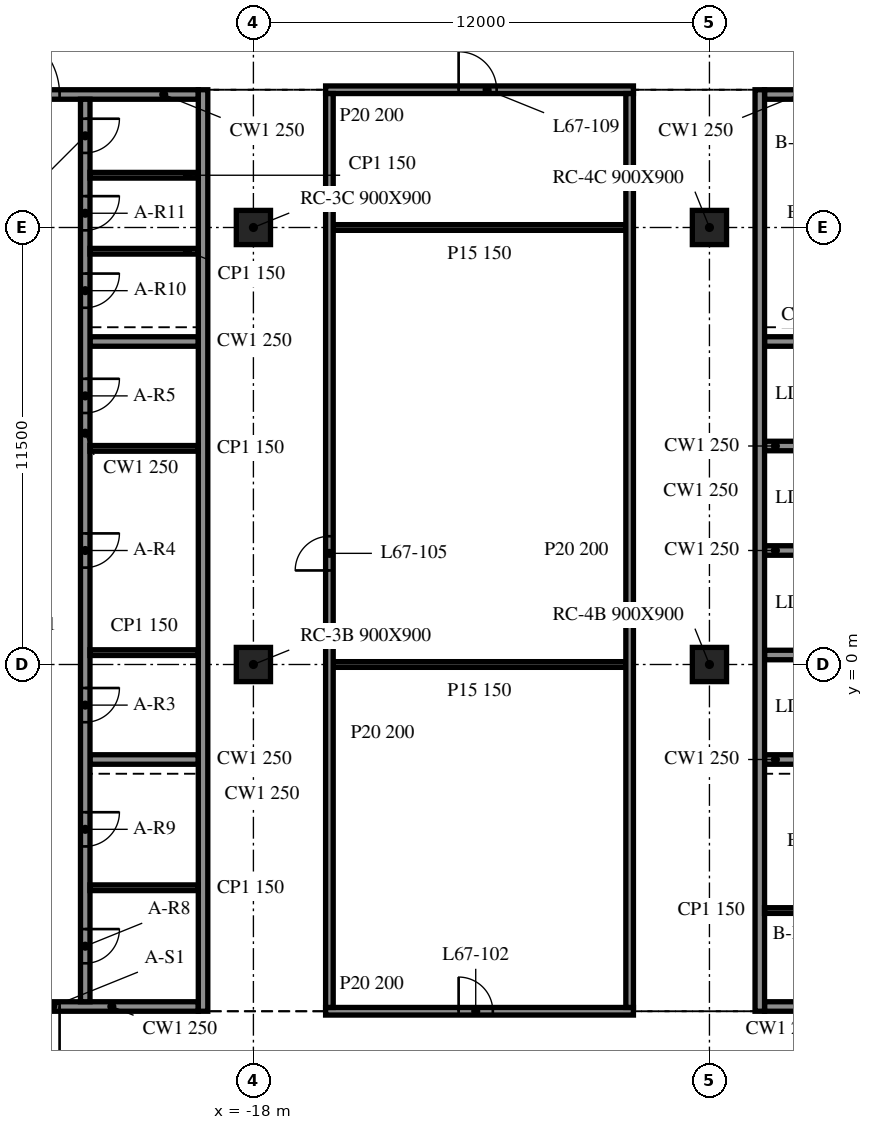
"""IFC4 building model, lengths in metres.
Left out: names, types, materials, properties, quantities, classifications, styles, units other than length and angle.
Written with IfcOpenShell. Run it as: python <this file> out.ifc"""

import sys

from ifc_helpers import new_model, si_unit, direction, frame, frame_2d, origin, origin_2d, place, context, subcontext, project, spatial, rectangle, extrude, element, fill, save


model = new_model("IFC4")
c1 = context("Model", 3, precision=1e-05, world=origin(), true_north=direction((0.0, 1.0)))
c2 = subcontext(c1, "Body", "Model", "MODEL_VIEW")
j1 = project(units=[si_unit("LENGTHUNIT", "METRE"), si_unit("PLANEANGLEUNIT", "RADIAN")], contexts=[c1])
p1 = place(None, origin())
s1 = spatial("IfcSite", under=j1, at=p1, CompositionType="ELEMENT")
p2 = place(p1, origin())
s2 = spatial("IfcBuilding", under=s1, at=p2, CompositionType="ELEMENT")
p3 = place(p2, frame((0.0, 0.0, 274.7)))
s3 = spatial("IfcBuildingStorey", under=s2, at=p3, CompositionType="ELEMENT", Elevation=274.7)
for number, where, z_axis, x_axis in (
    (1, (-18.0, 0.0, -0.34), (0.0, 0.0, 1.0), (1.0, 0.0, 0.0)),
    (2, (-18.0, 11.5, -0.34), (0.0, 0.0, 1.0), (1.0, 0.0, 0.0)),
    (3, (-6.0, 0.0, -0.34), (0.0, 0.0, 1.0), (1.0, 0.0, 0.0)),
    (4, (-6.0, 11.5, -0.34), (0.0, 0.0, 1.0), (1.0, 0.0, 0.0)),
):
    element("IfcColumn", number, at=place(p3, frame(where, z_axis=z_axis, x_axis=x_axis)), inside=s3, PredefinedType="COLUMN", context=c2, shape_type="SweptSolid", body=[
        extrude(rectangle(XDim=0.9, YDim=0.9, at=origin_2d()), origin(), (0.0, 0.0, 1.0), 3.8),
    ])
p4 = place(p3, frame((-19.325, -9.125, 0.0), z_axis=(0.0, 0.0, 1.0), x_axis=(0.0, 1.0, 0.0)))
e5 = element("IfcWall", 5, at=p4, inside=s3, PredefinedType="SOLIDWALL", context=c2, shape_type="SweptSolid", body=[
    extrude(rectangle(XDim=24.25, YDim=0.25, at=frame_2d((12.125, 0.0))), origin(), (0.0, 0.0, 1.0), 3.46),
])
p5 = place(p3, frame((-19.45, -9.0, 0.0), z_axis=(0.0, 0.0, 1.0), x_axis=(-1.0, 0.0, 0.0)))
e6 = element("IfcWall", 6, at=p5, inside=s3, PredefinedType="SOLIDWALL", context=c2, shape_type="SweptSolid", body=[
    extrude(rectangle(XDim=9.1, YDim=0.25, at=frame_2d((4.55, 0.0))), origin(), (0.0, 0.0, 1.0), 3.46),
])
p6 = place(p5, frame((3.65, 0.0, 0.0)))
e7 = element("IfcOpeningElement", 7, at=p6, cuts=e6, PredefinedType="OPENING", context=c2, shape_type="SweptSolid", body=[
    extrude(rectangle(XDim=1.8, YDim=2.1, at=frame_2d((0.9, 1.05))), frame((0.0, 0.135, 0.0), z_axis=(0.0, -1.0, 0.0), x_axis=(1.0, 0.0, 0.0)), (0.0, 0.0, 1.0), 0.27),
])
p7 = place(p3, frame((-28.55, 15.0, 0.0), z_axis=(0.0, 0.0, 1.0), x_axis=(1.0, 0.0, 0.0)))
e8 = element("IfcWall", 8, at=p7, inside=s3, PredefinedType="SOLIDWALL", context=c2, shape_type="SweptSolid", body=[
    extrude(rectangle(XDim=9.1, YDim=0.25, at=frame_2d((4.55, 0.0))), origin(), (0.0, 0.0, 1.0), 3.46),
])
p8 = place(p7, frame((3.65, 0.0, 0.0)))
e9 = element("IfcOpeningElement", 9, at=p8, cuts=e8, PredefinedType="OPENING", context=c2, shape_type="SweptSolid", body=[
    extrude(rectangle(XDim=1.8, YDim=2.1, at=frame_2d((0.9, 1.05))), frame((0.0, 0.135, 0.0), z_axis=(0.0, -1.0, 0.0), x_axis=(1.0, 0.0, 0.0)), (0.0, 0.0, 1.0), 0.27),
])
p9 = place(p3, frame((-22.425, 14.875, 0.0), z_axis=(0.0, 0.0, 1.0), x_axis=(0.0, -1.0, 0.0)))
e10 = element("IfcWall", 10, at=p9, inside=s3, PredefinedType="SOLIDWALL", context=c2, shape_type="SweptSolid", body=[
    extrude(rectangle(XDim=23.75, YDim=0.25, at=frame_2d((11.875, 0.0))), origin(), (0.0, 0.0, 1.0), 3.46),
])
p10 = place(p9, frame((15.494, 0.0, 0.0)))
e11 = element("IfcOpeningElement", 11, at=p10, cuts=e10, PredefinedType="OPENING", context=c2, shape_type="SweptSolid", body=[
    extrude(rectangle(XDim=0.9, YDim=2.1, at=frame_2d((0.45, 1.05))), frame((0.0, 0.135, 0.0), z_axis=(0.0, -1.0, 0.0), x_axis=(1.0, 0.0, 0.0)), (0.0, 0.0, 1.0), 0.27),
])
p11 = place(p9, frame((11.425, 0.0, 0.0)))
e12 = element("IfcOpeningElement", 12, at=p11, cuts=e10, PredefinedType="OPENING", context=c2, shape_type="SweptSolid", body=[
    extrude(rectangle(XDim=0.9, YDim=2.1, at=frame_2d((0.45, 1.05))), frame((0.0, 0.135, 0.0), z_axis=(0.0, -1.0, 0.0), x_axis=(1.0, 0.0, 0.0)), (0.0, 0.0, 1.0), 0.27),
])
p12 = place(p9, frame((7.356, 0.0, 0.0)))
e13 = element("IfcOpeningElement", 13, at=p12, cuts=e10, PredefinedType="OPENING", context=c2, shape_type="SweptSolid", body=[
    extrude(rectangle(XDim=0.9, YDim=2.1, at=frame_2d((0.45, 1.05))), frame((0.0, 0.135, 0.0), z_axis=(0.0, -1.0, 0.0), x_axis=(1.0, 0.0, 0.0)), (0.0, 0.0, 1.0), 0.27),
])
p13 = place(p9, frame((21.837, 0.0, 0.0)))
e14 = element("IfcOpeningElement", 14, at=p13, cuts=e10, PredefinedType="OPENING", context=c2, shape_type="SweptSolid", body=[
    extrude(rectangle(XDim=0.9, YDim=2.1, at=frame_2d((0.45, 1.05))), frame((0.0, 0.135, 0.0), z_axis=(0.0, -1.0, 0.0), x_axis=(1.0, 0.0, 0.0)), (0.0, 0.0, 1.0), 0.27),
])
p14 = place(p9, frame((18.762, 0.0, 0.0)))
e15 = element("IfcOpeningElement", 15, at=p14, cuts=e10, PredefinedType="OPENING", context=c2, shape_type="SweptSolid", body=[
    extrude(rectangle(XDim=0.9, YDim=2.1, at=frame_2d((0.45, 1.05))), frame((0.0, 0.135, 0.0), z_axis=(0.0, -1.0, 0.0), x_axis=(1.0, 0.0, 0.0)), (0.0, 0.0, 1.0), 0.27),
])
p15 = place(p9, frame((4.587, 0.0, 0.0)))
e16 = element("IfcOpeningElement", 16, at=p15, cuts=e10, PredefinedType="OPENING", context=c2, shape_type="SweptSolid", body=[
    extrude(rectangle(XDim=0.9, YDim=2.1, at=frame_2d((0.45, 1.05))), frame((0.0, 0.135, 0.0), z_axis=(0.0, -1.0, 0.0), x_axis=(1.0, 0.0, 0.0)), (0.0, 0.0, 1.0), 0.27),
])
p16 = place(p9, frame((2.55, 0.0, 0.0)))
e17 = element("IfcOpeningElement", 17, at=p16, cuts=e10, PredefinedType="OPENING", context=c2, shape_type="SweptSolid", body=[
    extrude(rectangle(XDim=0.9, YDim=2.1, at=frame_2d((0.45, 1.05))), frame((0.0, 0.135, 0.0), z_axis=(0.0, -1.0, 0.0), x_axis=(1.0, 0.0, 0.0)), (0.0, 0.0, 1.0), 0.27),
])
p17 = place(p9, frame((0.512, 0.0, 0.0)))
e18 = element("IfcOpeningElement", 18, at=p17, cuts=e10, PredefinedType="OPENING", context=c2, shape_type="SweptSolid", body=[
    extrude(rectangle(XDim=0.9, YDim=2.1, at=frame_2d((0.45, 1.05))), frame((0.0, 0.135, 0.0), z_axis=(0.0, -1.0, 0.0), x_axis=(1.0, 0.0, 0.0)), (0.0, 0.0, 1.0), 0.27),
])
for number, where, z_axis, x_axis in (
    (19, (-22.3, -2.5, 0.0), (0.0, 0.0, 1.0), (1.0, 0.0, 0.0)),
    (20, (-22.3, 8.5, 0.0), (0.0, 0.0, 1.0), (1.0, 0.0, 0.0)),
):
    element("IfcWall", number, at=place(p3, frame(where, z_axis=z_axis, x_axis=x_axis)), inside=s3, PredefinedType="SOLIDWALL", context=c2, shape_type="SweptSolid", body=[
        extrude(rectangle(XDim=2.85, YDim=0.25, at=frame_2d((1.425, 0.0))), origin(), (0.0, 0.0, 1.0), 3.46),
    ])
for number, where, z_axis, x_axis in (
    (21, (-22.3, 0.312, 0.0), (0.0, 0.0, 1.0), (1.0, 0.0, 0.0)),
    (22, (-22.3, 5.688, 0.0), (0.0, 0.0, 1.0), (1.0, 0.0, 0.0)),
    (23, (-22.3, -5.875, 0.0), (0.0, 0.0, 1.0), (1.0, 0.0, 0.0)),
    (24, (-22.3, 10.875, 0.0), (0.0, 0.0, 1.0), (1.0, 0.0, 0.0)),
    (25, (-22.3, 12.875, 0.0), (0.0, 0.0, 1.0), (1.0, 0.0, 0.0)),
):
    element("IfcWall", number, at=place(p3, frame(where, z_axis=z_axis, x_axis=x_axis)), inside=s3, PredefinedType="PARTITIONING", context=c2, shape_type="SweptSolid", body=[
        extrude(rectangle(XDim=2.85, YDim=0.15, at=frame_2d((1.425, 0.0))), origin(), (0.0, 0.0, 1.0), 3.46),
    ])
p18 = place(p3, frame((-4.675, 15.125, 0.0), z_axis=(0.0, 0.0, 1.0), x_axis=(0.0, -1.0, 0.0)))
e26 = element("IfcWall", 26, at=p18, inside=s3, PredefinedType="SOLIDWALL", context=c2, shape_type="SweptSolid", body=[
    extrude(rectangle(XDim=24.25, YDim=0.25, at=frame_2d((12.125, 0.0))), origin(), (0.0, 0.0, 1.0), 3.46),
])
p19 = place(p3, frame((4.55, -9.0, 0.0), z_axis=(0.0, 0.0, 1.0), x_axis=(-1.0, 0.0, 0.0)))
e27 = element("IfcWall", 27, at=p19, inside=s3, PredefinedType="SOLIDWALL", context=c2, shape_type="SweptSolid", body=[
    extrude(rectangle(XDim=9.1, YDim=0.25, at=frame_2d((4.55, 0.0))), origin(), (0.0, 0.0, 1.0), 3.46),
])
p20 = place(p19, frame((3.65, 0.0, 0.0)))
e28 = element("IfcOpeningElement", 28, at=p20, cuts=e27, PredefinedType="OPENING", context=c2, shape_type="SweptSolid", body=[
    extrude(rectangle(XDim=1.8, YDim=2.1, at=frame_2d((0.9, 1.05))), frame((0.0, 0.135, 0.0), z_axis=(0.0, -1.0, 0.0), x_axis=(1.0, 0.0, 0.0)), (0.0, 0.0, 1.0), 0.27),
])
p21 = place(p3, frame((-4.55, 15.0, 0.0), z_axis=(0.0, 0.0, 1.0), x_axis=(1.0, 0.0, 0.0)))
e29 = element("IfcWall", 29, at=p21, inside=s3, PredefinedType="SOLIDWALL", context=c2, shape_type="SweptSolid", body=[
    extrude(rectangle(XDim=9.1, YDim=0.25, at=frame_2d((4.55, 0.0))), origin(), (0.0, 0.0, 1.0), 3.46),
])
p22 = place(p21, frame((3.65, 0.0, 0.0)))
e30 = element("IfcOpeningElement", 30, at=p22, cuts=e29, PredefinedType="OPENING", context=c2, shape_type="SweptSolid", body=[
    extrude(rectangle(XDim=1.8, YDim=2.1, at=frame_2d((0.9, 1.05))), frame((0.0, 0.135, 0.0), z_axis=(0.0, -1.0, 0.0), x_axis=(1.0, 0.0, 0.0)), (0.0, 0.0, 1.0), 0.27),
])
for number, where, z_axis, x_axis in (
    (31, (-4.55, -2.5, 0.0), (0.0, 0.0, 1.0), (1.0, 0.0, 0.0)),
    (32, (-4.55, 0.25, 0.0), (0.0, 0.0, 1.0), (1.0, 0.0, 0.0)),
    (33, (-4.55, 3.0, 0.0), (0.0, 0.0, 1.0), (1.0, 0.0, 0.0)),
    (34, (-4.55, 5.75, 0.0), (0.0, 0.0, 1.0), (1.0, 0.0, 0.0)),
    (35, (-4.55, 8.5, 0.0), (0.0, 0.0, 1.0), (1.0, 0.0, 0.0)),
):
    element("IfcWall", number, at=place(p3, frame(where, z_axis=z_axis, x_axis=x_axis)), inside=s3, PredefinedType="SOLIDWALL", context=c2, shape_type="SweptSolid", body=[
        extrude(rectangle(XDim=2.85, YDim=0.25, at=frame_2d((1.425, 0.0))), origin(), (0.0, 0.0, 1.0), 3.46),
    ])
p23 = place(p3, frame((-4.55, -6.475, 0.0), z_axis=(0.0, 0.0, 1.0), x_axis=(1.0, 0.0, 0.0)))
e36 = element("IfcWall", 36, at=p23, inside=s3, PredefinedType="PARTITIONING", context=c2, shape_type="SweptSolid", body=[
    extrude(rectangle(XDim=2.85, YDim=0.15, at=frame_2d((1.425, 0.0))), origin(), (0.0, 0.0, 1.0), 3.46),
])
p24 = place(p3, frame((-16.1, -9.125, 0.0), z_axis=(0.0, 0.0, 1.0), x_axis=(1.0, 0.0, 0.0)))
e37 = element("IfcWall", 37, at=p24, inside=s3, PredefinedType="PARTITIONING", context=c2, shape_type="SweptSolid", body=[
    extrude(rectangle(XDim=8.1, YDim=0.2, at=frame_2d((4.05, 0.0))), origin(), (0.0, 0.0, 1.0), 3.46),
])
p25 = place(p24, frame((3.5, 0.0, 0.0)))
e38 = element("IfcOpeningElement", 38, at=p25, cuts=e37, PredefinedType="OPENING", context=c2, shape_type="SweptSolid", body=[
    extrude(rectangle(XDim=0.9, YDim=2.1, at=frame_2d((0.45, 1.05))), frame((0.0, 0.11, 0.0), z_axis=(0.0, -1.0, 0.0), x_axis=(1.0, 0.0, 0.0)), (0.0, 0.0, 1.0), 0.22),
])
for number, where, z_axis, x_axis in (
    (39, (-15.9, 0.0, 0.0), (0.0, 0.0, 1.0), (1.0, 0.0, 0.0)),
    (40, (-15.9, 11.5, 0.0), (0.0, 0.0, 1.0), (1.0, 0.0, 0.0)),
):
    element("IfcWall", number, at=place(p3, frame(where, z_axis=z_axis, x_axis=x_axis)), inside=s3, PredefinedType="PARTITIONING", context=c2, shape_type="SweptSolid", body=[
        extrude(rectangle(XDim=7.7, YDim=0.15, at=frame_2d((3.85, 0.0))), origin(), (0.0, 0.0, 1.0), 3.46),
    ])
p26 = place(p3, frame((-16.1, 15.125, 0.0), z_axis=(0.0, 0.0, 1.0), x_axis=(1.0, 0.0, 0.0)))
e41 = element("IfcWall", 41, at=p26, inside=s3, PredefinedType="PARTITIONING", context=c2, shape_type="SweptSolid", body=[
    extrude(rectangle(XDim=8.1, YDim=0.2, at=frame_2d((4.05, 0.0))), origin(), (0.0, 0.0, 1.0), 3.46),
])
p27 = place(p26, frame((3.5, 0.0, 0.0)))
e42 = element("IfcOpeningElement", 42, at=p27, cuts=e41, PredefinedType="OPENING", context=c2, shape_type="SweptSolid", body=[
    extrude(rectangle(XDim=1.0, YDim=2.1, at=frame_2d((0.5, 1.05))), frame((0.0, 0.11, 0.0), z_axis=(0.0, -1.0, 0.0), x_axis=(1.0, 0.0, 0.0)), (0.0, 0.0, 1.0), 0.22),
])
p28 = place(p3, frame((-16.0, -9.025, 0.0), z_axis=(0.0, 0.0, 1.0), x_axis=(0.0, 1.0, 0.0)))
e43 = element("IfcWall", 43, at=p28, inside=s3, PredefinedType="PARTITIONING", context=c2, shape_type="SweptSolid", body=[
    extrude(rectangle(XDim=24.05, YDim=0.2, at=frame_2d((12.025, 0.0))), origin(), (0.0, 0.0, 1.0), 3.46),
])
p29 = place(p28, frame((11.5, 0.0, 0.0)))
e44 = element("IfcOpeningElement", 44, at=p29, cuts=e43, PredefinedType="OPENING", context=c2, shape_type="SweptSolid", body=[
    extrude(rectangle(XDim=0.9, YDim=2.1, at=frame_2d((0.45, 1.05))), frame((0.0, 0.11, 0.0), z_axis=(0.0, -1.0, 0.0), x_axis=(1.0, 0.0, 0.0)), (0.0, 0.0, 1.0), 0.22),
])
p30 = place(p3, frame((-8.1, -9.025, 0.0), z_axis=(0.0, 0.0, 1.0), x_axis=(0.0, 1.0, 0.0)))
e45 = element("IfcWall", 45, at=p30, inside=s3, PredefinedType="PARTITIONING", context=c2, shape_type="SweptSolid", body=[
    extrude(rectangle(XDim=24.05, YDim=0.2, at=frame_2d((12.025, 0.0))), origin(), (0.0, 0.0, 1.0), 3.46),
])
p31 = place(p6, origin())
e46 = element("IfcDoor", 46, at=p31, inside=s3, OperationType="DOUBLE_DOOR_SINGLE_SWING", PredefinedType="DOOR", context=c2, shape_type="SweptSolid", body=[
    extrude(rectangle(XDim=1.8, YDim=2.1, at=frame_2d((0.9, 1.05))), frame((0.0, 0.025, 0.0), z_axis=(0.0, -1.0, 0.0), x_axis=(1.0, 0.0, 0.0)), (0.0, 0.0, 1.0), 0.05),
])
fill(e7, e46)
p32 = place(p8, origin())
e47 = element("IfcDoor", 47, at=p32, inside=s3, OperationType="DOUBLE_DOOR_SINGLE_SWING", PredefinedType="DOOR", context=c2, shape_type="SweptSolid", body=[
    extrude(rectangle(XDim=1.8, YDim=2.1, at=frame_2d((0.9, 1.05))), frame((0.0, 0.025, 0.0), z_axis=(0.0, -1.0, 0.0), x_axis=(1.0, 0.0, 0.0)), (0.0, 0.0, 1.0), 0.05),
])
fill(e9, e47)
p33 = place(p10, origin())
e48 = element("IfcDoor", 48, at=p33, inside=s3, OperationType="SINGLE_SWING_LEFT", PredefinedType="DOOR", context=c2, shape_type="SweptSolid", body=[
    extrude(rectangle(XDim=0.9, YDim=2.1, at=frame_2d((0.45, 1.05))), frame((0.0, 0.025, 0.0), z_axis=(0.0, -1.0, 0.0), x_axis=(1.0, 0.0, 0.0)), (0.0, 0.0, 1.0), 0.05),
])
fill(e11, e48)
p34 = place(p11, origin())
e49 = element("IfcDoor", 49, at=p34, inside=s3, OperationType="SINGLE_SWING_RIGHT", PredefinedType="DOOR", context=c2, shape_type="SweptSolid", body=[
    extrude(rectangle(XDim=0.9, YDim=2.1, at=frame_2d((0.45, 1.05))), frame((0.0, 0.025, 0.0), z_axis=(0.0, -1.0, 0.0), x_axis=(1.0, 0.0, 0.0)), (0.0, 0.0, 1.0), 0.05),
])
fill(e12, e49)
p35 = place(p12, origin())
e50 = element("IfcDoor", 50, at=p35, inside=s3, OperationType="SINGLE_SWING_LEFT", PredefinedType="DOOR", context=c2, shape_type="SweptSolid", body=[
    extrude(rectangle(XDim=0.9, YDim=2.1, at=frame_2d((0.45, 1.05))), frame((0.0, 0.025, 0.0), z_axis=(0.0, -1.0, 0.0), x_axis=(1.0, 0.0, 0.0)), (0.0, 0.0, 1.0), 0.05),
])
fill(e13, e50)
p36 = place(p13, origin())
e51 = element("IfcDoor", 51, at=p36, inside=s3, OperationType="SINGLE_SWING_RIGHT", PredefinedType="DOOR", context=c2, shape_type="SweptSolid", body=[
    extrude(rectangle(XDim=0.9, YDim=2.1, at=frame_2d((0.45, 1.05))), frame((0.0, 0.025, 0.0), z_axis=(0.0, -1.0, 0.0), x_axis=(1.0, 0.0, 0.0)), (0.0, 0.0, 1.0), 0.05),
])
fill(e14, e51)
p37 = place(p14, origin())
e52 = element("IfcDoor", 52, at=p37, inside=s3, OperationType="SINGLE_SWING_LEFT", PredefinedType="DOOR", context=c2, shape_type="SweptSolid", body=[
    extrude(rectangle(XDim=0.9, YDim=2.1, at=frame_2d((0.45, 1.05))), frame((0.0, 0.025, 0.0), z_axis=(0.0, -1.0, 0.0), x_axis=(1.0, 0.0, 0.0)), (0.0, 0.0, 1.0), 0.05),
])
fill(e15, e52)
p38 = place(p15, origin())
e53 = element("IfcDoor", 53, at=p38, inside=s3, OperationType="SINGLE_SWING_RIGHT", PredefinedType="DOOR", context=c2, shape_type="SweptSolid", body=[
    extrude(rectangle(XDim=0.9, YDim=2.1, at=frame_2d((0.45, 1.05))), frame((0.0, 0.025, 0.0), z_axis=(0.0, -1.0, 0.0), x_axis=(1.0, 0.0, 0.0)), (0.0, 0.0, 1.0), 0.05),
])
fill(e16, e53)
p39 = place(p16, origin())
e54 = element("IfcDoor", 54, at=p39, inside=s3, OperationType="SINGLE_SWING_LEFT", PredefinedType="DOOR", context=c2, shape_type="SweptSolid", body=[
    extrude(rectangle(XDim=0.9, YDim=2.1, at=frame_2d((0.45, 1.05))), frame((0.0, 0.025, 0.0), z_axis=(0.0, -1.0, 0.0), x_axis=(1.0, 0.0, 0.0)), (0.0, 0.0, 1.0), 0.05),
])
fill(e17, e54)
p40 = place(p17, origin())
e55 = element("IfcDoor", 55, at=p40, inside=s3, OperationType="SINGLE_SWING_RIGHT", PredefinedType="DOOR", context=c2, shape_type="SweptSolid", body=[
    extrude(rectangle(XDim=0.9, YDim=2.1, at=frame_2d((0.45, 1.05))), frame((0.0, 0.025, 0.0), z_axis=(0.0, -1.0, 0.0), x_axis=(1.0, 0.0, 0.0)), (0.0, 0.0, 1.0), 0.05),
])
fill(e18, e55)
p41 = place(p25, origin())
e56 = element("IfcDoor", 56, at=p41, inside=s3, OperationType="SINGLE_SWING_LEFT", PredefinedType="DOOR", context=c2, shape_type="SweptSolid", body=[
    extrude(rectangle(XDim=0.9, YDim=2.1, at=frame_2d((0.45, 1.05))), frame((0.0, 0.025, 0.0), z_axis=(0.0, -1.0, 0.0), x_axis=(1.0, 0.0, 0.0)), (0.0, 0.0, 1.0), 0.05),
])
fill(e38, e56)
p42 = place(p29, origin())
e57 = element("IfcDoor", 57, at=p42, inside=s3, OperationType="SINGLE_SWING_RIGHT", PredefinedType="DOOR", context=c2, shape_type="SweptSolid", body=[
    extrude(rectangle(XDim=0.9, YDim=2.1, at=frame_2d((0.45, 1.05))), frame((0.0, 0.025, 0.0), z_axis=(0.0, -1.0, 0.0), x_axis=(1.0, 0.0, 0.0)), (0.0, 0.0, 1.0), 0.05),
])
fill(e44, e57)
p43 = place(p27, origin())
e58 = element("IfcDoor", 58, at=p43, inside=s3, OperationType="SINGLE_SWING_RIGHT", PredefinedType="DOOR", context=c2, shape_type="SweptSolid", body=[
    extrude(rectangle(XDim=1.0, YDim=2.1, at=frame_2d((0.5, 1.05))), frame((0.0, 0.025, 0.0), z_axis=(0.0, -1.0, 0.0), x_axis=(1.0, 0.0, 0.0)), (0.0, 0.0, 1.0), 0.05),
])
fill(e42, e58)
save(model, sys.argv[1])
